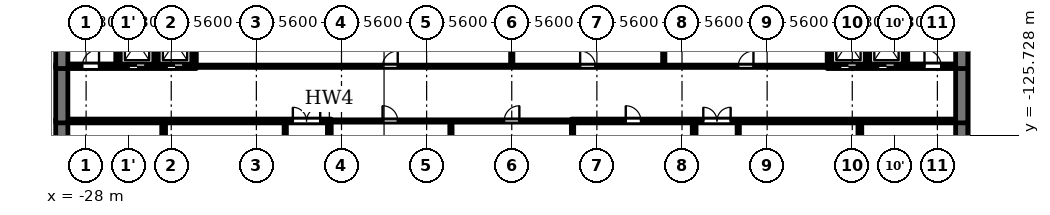
"""IFC4 building model, lengths in metres.
Left out: names, types, materials, properties, quantities, classifications, styles, units other than length and angle.
Written with IfcOpenShell. Run it as: python <this file> out.ifc"""

import sys

from ifc_helpers import new_model, si_unit, direction, frame, frame_2d, origin, place, context, subcontext, project, spatial, rectangle, extrude, element, fill, save


model = new_model("IFC4")
c1 = context("Model", 3, precision=1e-05, world=origin(), true_north=direction((0.0, 1.0)))
c2 = subcontext(c1, "Body", "Model", "MODEL_VIEW")
j1 = project(units=[si_unit("LENGTHUNIT", "METRE"), si_unit("PLANEANGLEUNIT", "RADIAN")], contexts=[c1])
p1 = place(None, origin())
s1 = spatial("IfcSite", under=j1, at=p1, CompositionType="ELEMENT")
p2 = place(p1, origin())
s2 = spatial("IfcBuilding", under=s1, at=p2, CompositionType="ELEMENT")
p3 = place(p2, frame((0.0, 0.0, -4.5)))
s3 = spatial("IfcBuildingStorey", under=s2, at=p3, CompositionType="ELEMENT", Elevation=-4.5)
p4 = place(p3, frame((-29.2, -124.8, 0.0), z_axis=(0.0, 0.0, 1.0), x_axis=(1.0, 0.0, 0.0)))
e1 = element("IfcWall", 1, at=p4, inside=s3, PredefinedType="SOLIDWALL", context=c2, shape_type="SweptSolid", body=[
    extrude(rectangle(XDim=17.325, YDim=0.25, at=frame_2d((8.663, 0.0))), origin(), (0.0, 0.0, 1.0), 4.15),
])
p5 = place(p4, frame((14.8, 0.0, 0.0)))
e2 = element("IfcOpeningElement", 2, at=p5, cuts=e1, PredefinedType="OPENING", context=c2, shape_type="SweptSolid", body=[
    extrude(rectangle(XDim=1.8, YDim=2.1, at=frame_2d((0.9, 1.05))), frame((0.0, 0.135, 0.0), z_axis=(0.0, -1.0, 0.0), x_axis=(1.0, 0.0, 0.0)), (0.0, 0.0, 1.0), 0.27),
])
p6 = place(p3, frame((-11.875, -124.8, 0.0), z_axis=(0.0, 0.0, 1.0), x_axis=(1.0, 0.0, 0.0)))
e3 = element("IfcWall", 3, at=p6, inside=s3, PredefinedType="PARTITIONING", context=c2, shape_type="SweptSolid", body=[
    extrude(rectangle(XDim=15.95, YDim=0.15, at=frame_2d((7.975, 0.0))), origin(), (0.0, 0.0, 1.0), 4.15),
])
p7 = place(p6, frame((3.375, 0.0, 0.0)))
e4 = element("IfcOpeningElement", 4, at=p7, cuts=e3, PredefinedType="OPENING", context=c2, shape_type="SweptSolid", body=[
    extrude(rectangle(XDim=1.0, YDim=2.1, at=frame_2d((0.5, 1.05))), frame((0.0, 0.085, 0.0), z_axis=(0.0, -1.0, 0.0), x_axis=(1.0, 0.0, 0.0)), (0.0, 0.0, 1.0), 0.17),
])
p8 = place(p6, frame((11.375, 0.0, 0.0)))
e5 = element("IfcOpeningElement", 5, at=p8, cuts=e3, PredefinedType="OPENING", context=c2, shape_type="SweptSolid", body=[
    extrude(rectangle(XDim=1.0, YDim=2.1, at=frame_2d((0.5, 1.05))), frame((0.0, 0.085, 0.0), z_axis=(0.0, -1.0, 0.0), x_axis=(1.0, 0.0, 0.0)), (0.0, 0.0, 1.0), 0.17),
])
p9 = place(p3, frame((3.925, -124.8, 0.0), z_axis=(0.0, 0.0, 1.0), x_axis=(1.0, 0.0, 0.0)))
e6 = element("IfcWall", 6, at=p9, inside=s3, PredefinedType="SOLIDWALL", context=c2, shape_type="SweptSolid", body=[
    extrude(rectangle(XDim=25.275, YDim=0.25, at=frame_2d((12.637, 0.0))), origin(), (0.0, 0.0, 1.0), 4.15),
])
p10 = place(p9, frame((8.675, 0.0, 0.0)))
e7 = element("IfcOpeningElement", 7, at=p10, cuts=e6, PredefinedType="OPENING", context=c2, shape_type="SweptSolid", body=[
    extrude(rectangle(XDim=1.8, YDim=2.1, at=frame_2d((0.9, 1.05))), frame((0.0, 0.135, 0.0), z_axis=(0.0, -1.0, 0.0), x_axis=(1.0, 0.0, 0.0)), (0.0, 0.0, 1.0), 0.27),
])
p11 = place(p9, frame((3.575, 0.0, 0.0)))
e8 = element("IfcOpeningElement", 8, at=p11, cuts=e6, PredefinedType="OPENING", context=c2, shape_type="SweptSolid", body=[
    extrude(rectangle(XDim=1.0, YDim=2.1, at=frame_2d((0.5, 1.05))), frame((0.0, 0.135, 0.0), z_axis=(0.0, -1.0, 0.0), x_axis=(1.0, 0.0, 0.0)), (0.0, 0.0, 1.0), 0.27),
])
p12 = place(p3, frame((-29.2, -121.2, 0.0), z_axis=(0.0, 0.0, 1.0), x_axis=(1.0, 0.0, 0.0)))
e9 = element("IfcWall", 9, at=p12, inside=s3, PredefinedType="SOLIDWALL", context=c2, shape_type="SweptSolid", body=[
    extrude(rectangle(XDim=8.45, YDim=0.3, at=frame_2d((4.225, 0.0))), origin(), (0.0, 0.0, 1.0), 4.15),
])
p13 = place(p12, frame((4.0, 0.0, 0.0)))
e10 = element("IfcOpeningElement", 10, at=p13, cuts=e9, PredefinedType="OPENING", context=c2, shape_type="SweptSolid", body=[
    extrude(rectangle(XDim=1.1, YDim=2.1, at=frame_2d((0.55, 1.05))), frame((0.0, 0.16, 0.0), z_axis=(0.0, -1.0, 0.0), x_axis=(1.0, 0.0, 0.0)), (0.0, 0.0, 1.0), 0.32),
])
p14 = place(p12, frame((6.5, 0.0, 0.0)))
e11 = element("IfcOpeningElement", 11, at=p14, cuts=e9, PredefinedType="OPENING", context=c2, shape_type="SweptSolid", body=[
    extrude(rectangle(XDim=1.1, YDim=2.1, at=frame_2d((0.55, 1.05))), frame((0.0, 0.16, 0.0), z_axis=(0.0, -1.0, 0.0), x_axis=(1.0, 0.0, 0.0)), (0.0, 0.0, 1.0), 0.32),
])
p15 = place(p12, frame((0.95, 0.0, 0.0)))
e12 = element("IfcOpeningElement", 12, at=p15, cuts=e9, PredefinedType="OPENING", context=c2, shape_type="SweptSolid", body=[
    extrude(rectangle(XDim=1.1, YDim=2.1, at=frame_2d((0.55, 1.05))), frame((0.0, 0.16, 0.0), z_axis=(0.0, -1.0, 0.0), x_axis=(1.0, 0.0, 0.0)), (0.0, 0.0, 1.0), 0.32),
])
p16 = place(p3, frame((-20.75, -121.2, 0.0), z_axis=(0.0, 0.0, 1.0), x_axis=(1.0, 0.0, 0.0)))
e13 = element("IfcWall", 13, at=p16, inside=s3, PredefinedType="PARTITIONING", context=c2, shape_type="SweptSolid", body=[
    extrude(rectangle(XDim=41.5, YDim=0.15, at=frame_2d((20.75, 0.0))), origin(), (0.0, 0.0, 1.0), 4.15),
])
p17 = place(p16, frame((12.25, 0.0, 0.0)))
e14 = element("IfcOpeningElement", 14, at=p17, cuts=e13, PredefinedType="OPENING", context=c2, shape_type="SweptSolid", body=[
    extrude(rectangle(XDim=1.0, YDim=2.1, at=frame_2d((0.5, 1.05))), frame((0.0, 0.085, 0.0), z_axis=(0.0, -1.0, 0.0), x_axis=(1.0, 0.0, 0.0)), (0.0, 0.0, 1.0), 0.17),
])
p18 = place(p16, frame((25.25, 0.0, 0.0)))
e15 = element("IfcOpeningElement", 15, at=p18, cuts=e13, PredefinedType="OPENING", context=c2, shape_type="SweptSolid", body=[
    extrude(rectangle(XDim=1.0, YDim=2.1, at=frame_2d((0.5, 1.05))), frame((0.0, 0.085, 0.0), z_axis=(0.0, -1.0, 0.0), x_axis=(1.0, 0.0, 0.0)), (0.0, 0.0, 1.0), 0.17),
])
p19 = place(p16, frame((35.65, 0.0, 0.0)))
e16 = element("IfcOpeningElement", 16, at=p19, cuts=e13, PredefinedType="OPENING", context=c2, shape_type="SweptSolid", body=[
    extrude(rectangle(XDim=1.0, YDim=2.1, at=frame_2d((0.5, 1.05))), frame((0.0, 0.085, 0.0), z_axis=(0.0, -1.0, 0.0), x_axis=(1.0, 0.0, 0.0)), (0.0, 0.0, 1.0), 0.17),
])
p20 = place(p3, frame((20.75, -121.2, 0.0), z_axis=(0.0, 0.0, 1.0), x_axis=(1.0, 0.0, 0.0)))
e17 = element("IfcWall", 17, at=p20, inside=s3, PredefinedType="SOLIDWALL", context=c2, shape_type="SweptSolid", body=[
    extrude(rectangle(XDim=8.45, YDim=0.3, at=frame_2d((4.225, 0.0))), origin(), (0.0, 0.0, 1.0), 4.15),
])
p21 = place(p20, frame((0.85, 0.0, 0.0)))
e18 = element("IfcOpeningElement", 18, at=p21, cuts=e17, PredefinedType="OPENING", context=c2, shape_type="SweptSolid", body=[
    extrude(rectangle(XDim=1.1, YDim=2.1, at=frame_2d((0.55, 1.05))), frame((0.0, 0.16, 0.0), z_axis=(0.0, -1.0, 0.0), x_axis=(1.0, 0.0, 0.0)), (0.0, 0.0, 1.0), 0.32),
])
p22 = place(p20, frame((3.35, 0.0, 0.0)))
e19 = element("IfcOpeningElement", 19, at=p22, cuts=e17, PredefinedType="OPENING", context=c2, shape_type="SweptSolid", body=[
    extrude(rectangle(XDim=1.1, YDim=2.1, at=frame_2d((0.55, 1.05))), frame((0.0, 0.16, 0.0), z_axis=(0.0, -1.0, 0.0), x_axis=(1.0, 0.0, 0.0)), (0.0, 0.0, 1.0), 0.32),
])
p23 = place(p20, frame((6.4, 0.0, 0.0)))
e20 = element("IfcOpeningElement", 20, at=p23, cuts=e17, PredefinedType="OPENING", context=c2, shape_type="SweptSolid", body=[
    extrude(rectangle(XDim=1.1, YDim=2.1, at=frame_2d((0.55, 1.05))), frame((0.0, 0.16, 0.0), z_axis=(0.0, -1.0, 0.0), x_axis=(1.0, 0.0, 0.0)), (0.0, 0.0, 1.0), 0.32),
])
p24 = place(p3, frame((-29.6, -131.325, 0.0), z_axis=(0.0, 0.0, 1.0), x_axis=(0.0, 1.0, 0.0)))
e21 = element("IfcWall", 21, at=p24, inside=s3, PredefinedType="SOLIDWALL", context=c2, shape_type="SweptSolid", body=[
    extrude(rectangle(XDim=6.65, YDim=0.8, at=frame_2d((3.325, 0.0))), origin(), (0.0, 0.0, 1.0), 4.15),
])
p25 = place(p3, frame((-29.6, -124.925, 0.0), z_axis=(0.0, 0.0, 1.0), x_axis=(0.0, 1.0, 0.0)))
e22 = element("IfcWall", 22, at=p25, inside=s3, PredefinedType="SOLIDWALL", context=c2, shape_type="SweptSolid", body=[
    extrude(rectangle(XDim=3.875, YDim=0.8, at=frame_2d((1.938, 0.0))), origin(), (0.0, 0.0, 1.0), 4.15),
])
p26 = place(p3, frame((-29.6, -121.35, 0.0), z_axis=(0.0, 0.0, 1.0), x_axis=(0.0, 1.0, 0.0)))
e23 = element("IfcWall", 23, at=p26, inside=s3, PredefinedType="SOLIDWALL", context=c2, shape_type="SweptSolid", body=[
    extrude(rectangle(XDim=8.15, YDim=0.8, at=frame_2d((4.075, 0.0))), origin(), (0.0, 0.0, 1.0), 4.15),
])
p27 = place(p3, frame((-25.9, -121.05, 0.0), z_axis=(0.0, 0.0, 1.0), x_axis=(0.0, 1.0, 0.0)))
e24 = element("IfcWall", 24, at=p27, inside=s3, PredefinedType="SOLIDWALL", context=c2, shape_type="SweptSolid", body=[
    extrude(rectangle(XDim=7.85, YDim=0.3, at=frame_2d((3.925, 0.0))), origin(), (0.0, 0.0, 1.0), 4.15),
])
p28 = place(p3, frame((-23.4, -121.05, 0.0), z_axis=(0.0, 0.0, 1.0), x_axis=(0.0, 1.0, 0.0)))
e25 = element("IfcWall", 25, at=p28, inside=s3, PredefinedType="SOLIDWALL", context=c2, shape_type="SweptSolid", body=[
    extrude(rectangle(XDim=4.1, YDim=0.3, at=frame_2d((2.05, 0.0))), origin(), (0.0, 0.0, 1.0), 4.15),
])
p29 = place(p3, frame((-22.9, -131.075, 0.0), z_axis=(0.0, 0.0, 1.0), x_axis=(0.0, 1.0, 0.0)))
e26 = element("IfcWall", 26, at=p29, inside=s3, PredefinedType="SOLIDWALL", context=c2, shape_type="SweptSolid", body=[
    extrude(rectangle(XDim=6.15, YDim=0.25, at=frame_2d((3.075, 0.0))), origin(), (0.0, 0.0, 1.0), 4.15),
])
p30 = place(p3, frame((-20.9, -121.125, 0.0), z_axis=(0.0, 0.0, 1.0), x_axis=(0.0, 1.0, 0.0)))
e27 = element("IfcWall", 27, at=p30, inside=s3, PredefinedType="SOLIDWALL", context=c2, shape_type="SweptSolid", body=[
    extrude(rectangle(XDim=4.175, YDim=0.3, at=frame_2d((2.087, 0.0))), origin(), (0.0, 0.0, 1.0), 4.15),
])
p31 = place(p3, frame((-14.9, -131.075, 0.0), z_axis=(0.0, 0.0, 1.0), x_axis=(0.0, 1.0, 0.0)))
e28 = element("IfcWall", 28, at=p31, inside=s3, PredefinedType="PARTITIONING", context=c2, shape_type="SweptSolid", body=[
    extrude(rectangle(XDim=6.15, YDim=0.15, at=frame_2d((3.075, 0.0))), origin(), (0.0, 0.0, 1.0), 4.15),
])
p32 = place(p3, frame((-12.0, -144.8, 0.0), z_axis=(0.0, 0.0, 1.0), x_axis=(0.0, 1.0, 0.0)))
e29 = element("IfcWall", 29, at=p32, inside=s3, PredefinedType="SOLIDWALL", context=c2, shape_type="SweptSolid", body=[
    extrude(rectangle(XDim=19.95, YDim=0.25, at=frame_2d((9.975, 0.0))), origin(), (0.0, 0.0, 1.0), 4.15),
])
p33 = place(p3, frame((-4.0, -141.6, 0.0), z_axis=(0.0, 0.0, 1.0), x_axis=(0.0, 1.0, 0.0)))
e30 = element("IfcWall", 30, at=p33, inside=s3, PredefinedType="PARTITIONING", context=c2, shape_type="SweptSolid", body=[
    extrude(rectangle(XDim=16.725, YDim=0.15, at=frame_2d((8.363, 0.0))), origin(), (0.0, 0.0, 1.0), 4.15),
])
p34 = place(p3, frame((0.0, -121.125, 0.0), z_axis=(0.0, 0.0, 1.0), x_axis=(0.0, 1.0, 0.0)))
e31 = element("IfcWall", 31, at=p34, inside=s3, PredefinedType="PARTITIONING", context=c2, shape_type="SweptSolid", body=[
    extrude(rectangle(XDim=7.925, YDim=0.15, at=frame_2d((3.962, 0.0))), origin(), (0.0, 0.0, 1.0), 4.15),
])
p35 = place(p3, frame((4.0, -141.6, 0.0), z_axis=(0.0, 0.0, 1.0), x_axis=(0.0, 1.0, 0.0)))
e32 = element("IfcWall", 32, at=p35, inside=s3, PredefinedType="PARTITIONING", context=c2, shape_type="SweptSolid", body=[
    extrude(rectangle(XDim=16.675, YDim=0.15, at=frame_2d((8.337, 0.0))), origin(), (0.0, 0.0, 1.0), 4.15),
])
p36 = place(p3, frame((10.0, -121.125, 0.0), z_axis=(0.0, 0.0, 1.0), x_axis=(0.0, 1.0, 0.0)))
e33 = element("IfcWall", 33, at=p36, inside=s3, PredefinedType="PARTITIONING", context=c2, shape_type="SweptSolid", body=[
    extrude(rectangle(XDim=7.925, YDim=0.15, at=frame_2d((3.962, 0.0))), origin(), (0.0, 0.0, 1.0), 4.15),
])
p37 = place(p3, frame((12.0, -144.8, 0.0), z_axis=(0.0, 0.0, 1.0), x_axis=(0.0, 1.0, 0.0)))
e34 = element("IfcWall", 34, at=p37, inside=s3, PredefinedType="SOLIDWALL", context=c2, shape_type="SweptSolid", body=[
    extrude(rectangle(XDim=19.875, YDim=0.25, at=frame_2d((9.938, 0.0))), origin(), (0.0, 0.0, 1.0), 4.15),
])
p38 = place(p3, frame((14.9, -131.075, 0.0), z_axis=(0.0, 0.0, 1.0), x_axis=(0.0, 1.0, 0.0)))
e35 = element("IfcWall", 35, at=p38, inside=s3, PredefinedType="PARTITIONING", context=c2, shape_type="SweptSolid", body=[
    extrude(rectangle(XDim=6.15, YDim=0.15, at=frame_2d((3.075, 0.0))), origin(), (0.0, 0.0, 1.0), 4.15),
])
p39 = place(p3, frame((20.9, -121.125, 0.0), z_axis=(0.0, 0.0, 1.0), x_axis=(0.0, 1.0, 0.0)))
e36 = element("IfcWall", 36, at=p39, inside=s3, PredefinedType="SOLIDWALL", context=c2, shape_type="SweptSolid", body=[
    extrude(rectangle(XDim=4.175, YDim=0.3, at=frame_2d((2.087, 0.0))), origin(), (0.0, 0.0, 1.0), 4.15),
])
p40 = place(p3, frame((22.9, -131.075, 0.0), z_axis=(0.0, 0.0, 1.0), x_axis=(0.0, 1.0, 0.0)))
e37 = element("IfcWall", 37, at=p40, inside=s3, PredefinedType="SOLIDWALL", context=c2, shape_type="SweptSolid", body=[
    extrude(rectangle(XDim=6.15, YDim=0.25, at=frame_2d((3.075, 0.0))), origin(), (0.0, 0.0, 1.0), 4.15),
])
p41 = place(p3, frame((23.4, -121.05, 0.0), z_axis=(0.0, 0.0, 1.0), x_axis=(0.0, 1.0, 0.0)))
e38 = element("IfcWall", 38, at=p41, inside=s3, PredefinedType="SOLIDWALL", context=c2, shape_type="SweptSolid", body=[
    extrude(rectangle(XDim=4.1, YDim=0.3, at=frame_2d((2.05, 0.0))), origin(), (0.0, 0.0, 1.0), 4.15),
])
p42 = place(p3, frame((25.9, -121.05, 0.0), z_axis=(0.0, 0.0, 1.0), x_axis=(0.0, 1.0, 0.0)))
e39 = element("IfcWall", 39, at=p42, inside=s3, PredefinedType="SOLIDWALL", context=c2, shape_type="SweptSolid", body=[
    extrude(rectangle(XDim=7.85, YDim=0.3, at=frame_2d((3.925, 0.0))), origin(), (0.0, 0.0, 1.0), 4.15),
])
p43 = place(p3, frame((29.6, -124.675, 0.0), z_axis=(0.0, 0.0, 1.0), x_axis=(0.0, -1.0, 0.0)))
e40 = element("IfcWall", 40, at=p43, inside=s3, PredefinedType="SOLIDWALL", context=c2, shape_type="SweptSolid", body=[
    extrude(rectangle(XDim=6.65, YDim=0.8, at=frame_2d((3.325, 0.0))), origin(), (0.0, 0.0, 1.0), 4.15),
])
p44 = place(p3, frame((29.6, -121.05, 0.0), z_axis=(0.0, 0.0, 1.0), x_axis=(0.0, -1.0, 0.0)))
e41 = element("IfcWall", 41, at=p44, inside=s3, PredefinedType="SOLIDWALL", context=c2, shape_type="SweptSolid", body=[
    extrude(rectangle(XDim=3.875, YDim=0.8, at=frame_2d((1.938, 0.0))), origin(), (0.0, 0.0, 1.0), 4.15),
])
p45 = place(p3, frame((29.6, -113.2, 0.0), z_axis=(0.0, 0.0, 1.0), x_axis=(0.0, -1.0, 0.0)))
e42 = element("IfcWall", 42, at=p45, inside=s3, PredefinedType="SOLIDWALL", context=c2, shape_type="SweptSolid", body=[
    extrude(rectangle(XDim=8.15, YDim=0.8, at=frame_2d((4.075, 0.0))), origin(), (0.0, 0.0, 1.0), 4.15),
])
p46 = place(p13, origin())
e43 = element("IfcDoor", 43, at=p46, inside=s3, OperationType="DOUBLE_DOOR_SLIDING", PredefinedType="DOOR", context=c2, shape_type="SweptSolid", body=[
    extrude(rectangle(XDim=1.1, YDim=2.1, at=frame_2d((0.55, 1.05))), frame((0.0, 0.025, 0.0), z_axis=(0.0, -1.0, 0.0), x_axis=(1.0, 0.0, 0.0)), (0.0, 0.0, 1.0), 0.05),
])
fill(e10, e43)
p47 = place(p14, origin())
e44 = element("IfcDoor", 44, at=p47, inside=s3, OperationType="DOUBLE_DOOR_SLIDING", PredefinedType="DOOR", context=c2, shape_type="SweptSolid", body=[
    extrude(rectangle(XDim=1.1, YDim=2.1, at=frame_2d((0.55, 1.05))), frame((0.0, 0.025, 0.0), z_axis=(0.0, -1.0, 0.0), x_axis=(1.0, 0.0, 0.0)), (0.0, 0.0, 1.0), 0.05),
])
fill(e11, e44)
p48 = place(p21, origin())
e45 = element("IfcDoor", 45, at=p48, inside=s3, OperationType="DOUBLE_DOOR_SLIDING", PredefinedType="DOOR", context=c2, shape_type="SweptSolid", body=[
    extrude(rectangle(XDim=1.1, YDim=2.1, at=frame_2d((0.55, 1.05))), frame((0.0, 0.025, 0.0), z_axis=(0.0, -1.0, 0.0), x_axis=(1.0, 0.0, 0.0)), (0.0, 0.0, 1.0), 0.05),
])
fill(e18, e45)
p49 = place(p22, origin())
e46 = element("IfcDoor", 46, at=p49, inside=s3, OperationType="DOUBLE_DOOR_SLIDING", PredefinedType="DOOR", context=c2, shape_type="SweptSolid", body=[
    extrude(rectangle(XDim=1.1, YDim=2.1, at=frame_2d((0.55, 1.05))), frame((0.0, 0.025, 0.0), z_axis=(0.0, -1.0, 0.0), x_axis=(1.0, 0.0, 0.0)), (0.0, 0.0, 1.0), 0.05),
])
fill(e19, e46)
p50 = place(p15, origin())
e47 = element("IfcDoor", 47, at=p50, inside=s3, OperationType="SINGLE_SWING_RIGHT", PredefinedType="DOOR", context=c2, shape_type="SweptSolid", body=[
    extrude(rectangle(XDim=1.1, YDim=2.1, at=frame_2d((0.55, 1.05))), frame((0.0, 0.025, 0.0), z_axis=(0.0, -1.0, 0.0), x_axis=(1.0, 0.0, 0.0)), (0.0, 0.0, 1.0), 0.05),
])
fill(e12, e47)
p51 = place(p23, origin())
e48 = element("IfcDoor", 48, at=p51, inside=s3, OperationType="SINGLE_SWING_LEFT", PredefinedType="DOOR", context=c2, shape_type="SweptSolid", body=[
    extrude(rectangle(XDim=1.1, YDim=2.1, at=frame_2d((0.55, 1.05))), frame((0.0, 0.025, 0.0), z_axis=(0.0, -1.0, 0.0), x_axis=(1.0, 0.0, 0.0)), (0.0, 0.0, 1.0), 0.05),
])
fill(e20, e48)
p52 = place(p17, origin())
e49 = element("IfcDoor", 49, at=p52, inside=s3, OperationType="SINGLE_SWING_RIGHT", PredefinedType="DOOR", context=c2, shape_type="SweptSolid", body=[
    extrude(rectangle(XDim=1.0, YDim=2.1, at=frame_2d((0.5, 1.05))), frame((0.0, 0.025, 0.0), z_axis=(0.0, -1.0, 0.0), x_axis=(1.0, 0.0, 0.0)), (0.0, 0.0, 1.0), 0.05),
])
fill(e14, e49)
p53 = place(p18, origin())
e50 = element("IfcDoor", 50, at=p53, inside=s3, OperationType="SINGLE_SWING_LEFT", PredefinedType="DOOR", context=c2, shape_type="SweptSolid", body=[
    extrude(rectangle(XDim=1.0, YDim=2.1, at=frame_2d((0.5, 1.05))), frame((0.0, 0.025, 0.0), z_axis=(0.0, -1.0, 0.0), x_axis=(1.0, 0.0, 0.0)), (0.0, 0.0, 1.0), 0.05),
])
fill(e15, e50)
p54 = place(p19, origin())
e51 = element("IfcDoor", 51, at=p54, inside=s3, OperationType="SINGLE_SWING_RIGHT", PredefinedType="DOOR", context=c2, shape_type="SweptSolid", body=[
    extrude(rectangle(XDim=1.0, YDim=2.1, at=frame_2d((0.5, 1.05))), frame((0.0, 0.025, 0.0), z_axis=(0.0, -1.0, 0.0), x_axis=(1.0, 0.0, 0.0)), (0.0, 0.0, 1.0), 0.05),
])
fill(e16, e51)
p55 = place(p5, origin())
e52 = element("IfcDoor", 52, at=p55, inside=s3, OperationType="DOUBLE_DOOR_SINGLE_SWING", PredefinedType="DOOR", context=c2, shape_type="SweptSolid", body=[
    extrude(rectangle(XDim=1.8, YDim=2.1, at=frame_2d((0.9, 1.05))), frame((0.0, 0.025, 0.0), z_axis=(0.0, -1.0, 0.0), x_axis=(1.0, 0.0, 0.0)), (0.0, 0.0, 1.0), 0.05),
])
fill(e2, e52)
p56 = place(p10, origin())
e53 = element("IfcDoor", 53, at=p56, inside=s3, OperationType="DOUBLE_DOOR_SINGLE_SWING", PredefinedType="DOOR", context=c2, shape_type="SweptSolid", body=[
    extrude(rectangle(XDim=1.8, YDim=2.1, at=frame_2d((0.9, 1.05))), frame((0.0, 0.025, 0.0), z_axis=(0.0, -1.0, 0.0), x_axis=(1.0, 0.0, 0.0)), (0.0, 0.0, 1.0), 0.05),
])
fill(e7, e53)
p57 = place(p7, origin())
e54 = element("IfcDoor", 54, at=p57, inside=s3, OperationType="SINGLE_SWING_LEFT", PredefinedType="DOOR", context=c2, shape_type="SweptSolid", body=[
    extrude(rectangle(XDim=1.0, YDim=2.1, at=frame_2d((0.5, 1.05))), frame((0.0, 0.025, 0.0), z_axis=(0.0, -1.0, 0.0), x_axis=(1.0, 0.0, 0.0)), (0.0, 0.0, 1.0), 0.05),
])
fill(e4, e54)
p58 = place(p8, origin())
e55 = element("IfcDoor", 55, at=p58, inside=s3, OperationType="SINGLE_SWING_RIGHT", PredefinedType="DOOR", context=c2, shape_type="SweptSolid", body=[
    extrude(rectangle(XDim=1.0, YDim=2.1, at=frame_2d((0.5, 1.05))), frame((0.0, 0.025, 0.0), z_axis=(0.0, -1.0, 0.0), x_axis=(1.0, 0.0, 0.0)), (0.0, 0.0, 1.0), 0.05),
])
fill(e5, e55)
p59 = place(p11, origin())
e56 = element("IfcDoor", 56, at=p59, inside=s3, OperationType="SINGLE_SWING_LEFT", PredefinedType="DOOR", context=c2, shape_type="SweptSolid", body=[
    extrude(rectangle(XDim=1.0, YDim=2.1, at=frame_2d((0.5, 1.05))), frame((0.0, 0.025, 0.0), z_axis=(0.0, -1.0, 0.0), x_axis=(1.0, 0.0, 0.0)), (0.0, 0.0, 1.0), 0.05),
])
fill(e8, e56)
save(model, sys.argv[1])
